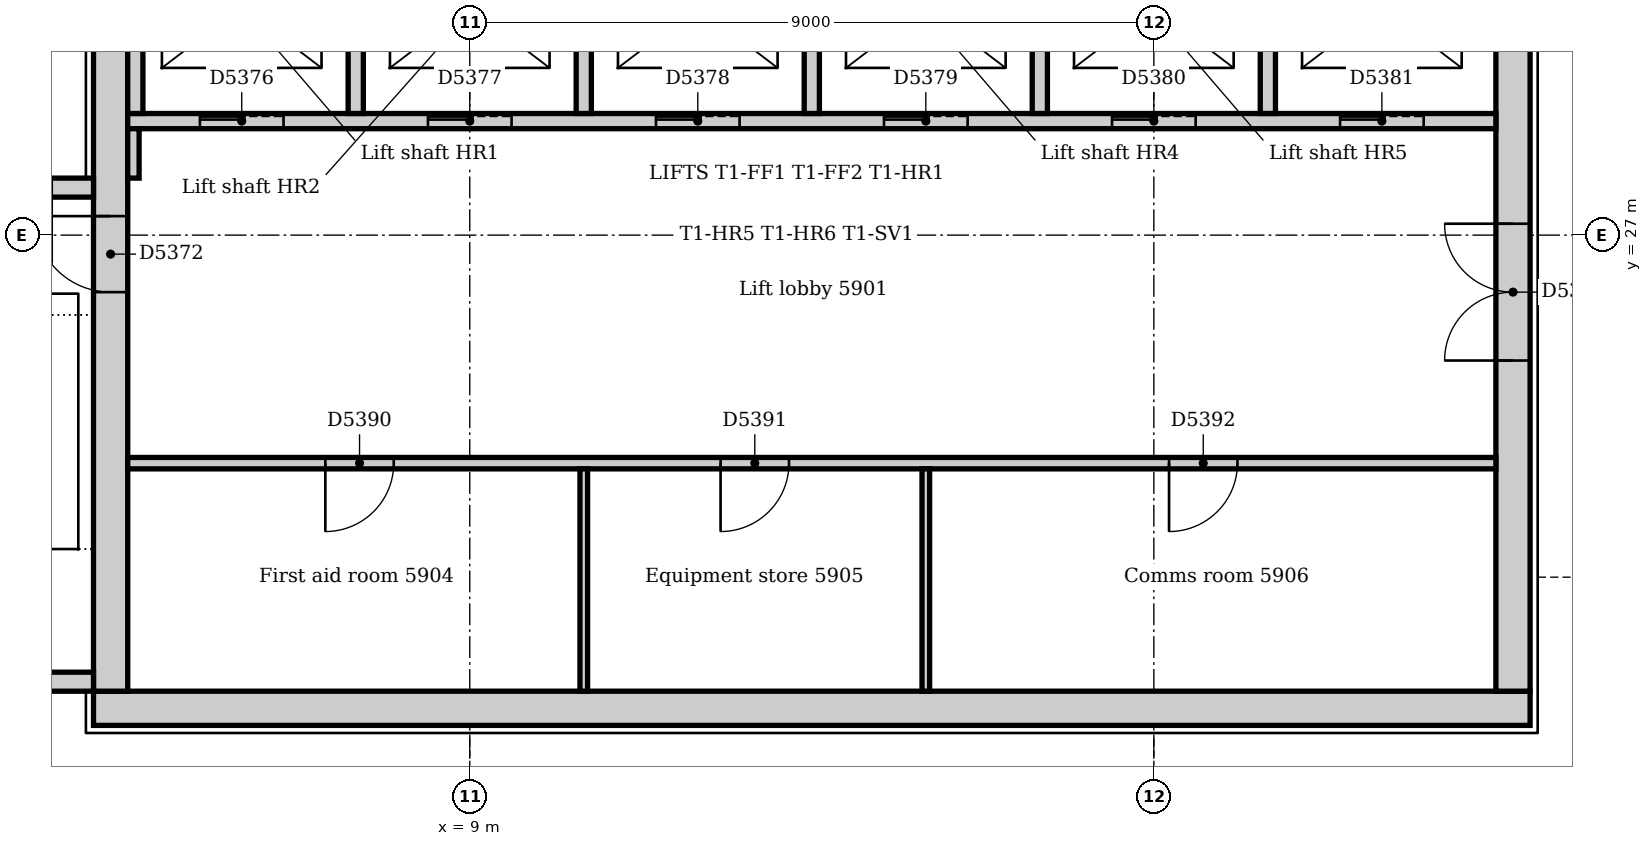
"""IFC4 building model, lengths in metres.
Left out: names, types, materials, properties, quantities, classifications, styles, units other than length and angle.
Written with IfcOpenShell. Run it as: python <this file> out.ifc"""

import sys

from ifc_helpers import new_model, si_unit, direction, frame, frame_2d, origin, place, context, subcontext, project, spatial, rectangle, extrude, element, fill, save


model = new_model("IFC4")
c1 = context("Model", 3, precision=1e-05, world=origin(), true_north=direction((0.0, 1.0)))
c2 = subcontext(c1, "Body", "Model", "MODEL_VIEW")
j1 = project(units=[si_unit("LENGTHUNIT", "METRE"), si_unit("PLANEANGLEUNIT", "RADIAN")], contexts=[c1])
p1 = place(None, origin())
s1 = spatial("IfcSite", under=j1, at=p1, CompositionType="ELEMENT")
p2 = place(p1, origin())
s2 = spatial("IfcBuilding", under=s1, at=p2, CompositionType="ELEMENT")
p3 = place(p2, frame((0.0, 0.0, 247.0)))
s3 = spatial("IfcBuildingStorey", under=s2, at=p3, CompositionType="ELEMENT", Elevation=247.0)
p4 = place(p3, frame((4.05, 20.775, 0.0), z_axis=(0.0, 0.0, 1.0), x_axis=(1.0, 0.0, 0.0)))
e1 = element("IfcWall", 1, at=p4, inside=s3, PredefinedType="SOLIDWALL", context=c2, shape_type="SweptSolid", body=[
    extrude(rectangle(XDim=18.9, YDim=0.45, at=frame_2d((9.45, 0.0))), origin(), (0.0, 0.0, 1.0), 4.0),
])
p5 = place(p3, frame((22.725, 21.0, 0.0), z_axis=(0.0, 0.0, 1.0), x_axis=(0.0, 1.0, 0.0)))
e2 = element("IfcWall", 2, at=p5, inside=s3, PredefinedType="SOLIDWALL", context=c2, shape_type="SweptSolid", body=[
    extrude(rectangle(XDim=10.5, YDim=0.45, at=frame_2d((5.25, 0.0))), origin(), (0.0, 0.0, 1.0), 4.0),
])
p6 = place(p5, frame((4.35, 0.0, 0.0)))
e3 = element("IfcOpeningElement", 3, at=p6, cuts=e2, PredefinedType="OPENING", context=c2, shape_type="SweptSolid", body=[
    extrude(rectangle(XDim=1.8, YDim=2.1, at=frame_2d((0.9, 1.05))), frame((0.0, 0.235, 0.0), z_axis=(0.0, -1.0, 0.0), x_axis=(1.0, 0.0, 0.0)), (0.0, 0.0, 1.0), 0.47),
])
p7 = place(p3, frame((4.275, 31.5, 0.0), z_axis=(0.0, 0.0, 1.0), x_axis=(0.0, -1.0, 0.0)))
e4 = element("IfcWall", 4, at=p7, inside=s3, PredefinedType="SOLIDWALL", context=c2, shape_type="SweptSolid", body=[
    extrude(rectangle(XDim=10.5, YDim=0.45, at=frame_2d((5.25, 0.0))), origin(), (0.0, 0.0, 1.0), 4.0),
])
p8 = place(p7, frame((4.25, 0.0, 0.0)))
e5 = element("IfcOpeningElement", 5, at=p8, cuts=e4, PredefinedType="OPENING", context=c2, shape_type="SweptSolid", body=[
    extrude(rectangle(XDim=1.0, YDim=2.1, at=frame_2d((0.5, 1.05))), frame((0.0, 0.235, 0.0), z_axis=(0.0, -1.0, 0.0), x_axis=(1.0, 0.0, 0.0)), (0.0, 0.0, 1.0), 0.47),
])
p9 = place(p3, frame((0.36, 21.125, 0.0), z_axis=(0.0, 0.0, 1.0), x_axis=(1.0, 0.0, 0.0)))
e6 = element("IfcWall", 6, at=p9, inside=s3, PredefinedType="SOLIDWALL", context=c2, shape_type="SweptSolid", body=[
    extrude(rectangle(XDim=3.69, YDim=0.25, at=frame_2d((1.845, 0.0))), origin(), (0.0, 0.0, 1.0), 4.0),
])
p10 = place(p3, frame((4.05, 27.625, 0.0), z_axis=(0.0, 0.0, 1.0), x_axis=(-1.0, 0.0, 0.0)))
e7 = element("IfcWall", 7, at=p10, inside=s3, PredefinedType="SOLIDWALL", context=c2, shape_type="SweptSolid", body=[
    extrude(rectangle(XDim=3.69, YDim=0.25, at=frame_2d((1.845, 0.0))), origin(), (0.0, 0.0, 1.0), 4.0),
])
p11 = place(p10, frame((0.55, 0.0, 0.0)))
e8 = element("IfcOpeningElement", 8, at=p11, cuts=e7, PredefinedType="OPENING", context=c2, shape_type="SweptSolid", body=[
    extrude(rectangle(XDim=1.0, YDim=2.1, at=frame_2d((0.5, 1.05))), frame((0.0, 0.135, 0.0), z_axis=(0.0, -1.0, 0.0), x_axis=(1.0, 0.0, 0.0)), (0.0, 0.0, 1.0), 0.27),
])
p12 = place(p3, frame((4.5, 28.5, 0.0), z_axis=(0.0, 0.0, 1.0), x_axis=(1.0, 0.0, 0.0)))
e9 = element("IfcWall", 9, at=p12, inside=s3, PredefinedType="PARTITIONING", context=c2, shape_type="SweptSolid", body=[
    extrude(rectangle(XDim=18.0, YDim=0.2, at=frame_2d((9.0, 0.0))), origin(), (0.0, 0.0, 1.0), 3.85),
])
p13 = place(p12, frame((0.95, 0.0, 0.0)))
e10 = element("IfcOpeningElement", 10, at=p13, cuts=e9, PredefinedType="OPENING", context=c2, shape_type="SweptSolid", body=[
    extrude(rectangle(XDim=1.1, YDim=2.1, at=frame_2d((0.55, 1.05))), frame((0.0, 0.11, 0.0), z_axis=(0.0, -1.0, 0.0), x_axis=(1.0, 0.0, 0.0)), (0.0, 0.0, 1.0), 0.22),
])
p14 = place(p12, frame((3.95, 0.0, 0.0)))
e11 = element("IfcOpeningElement", 11, at=p14, cuts=e9, PredefinedType="OPENING", context=c2, shape_type="SweptSolid", body=[
    extrude(rectangle(XDim=1.1, YDim=2.1, at=frame_2d((0.55, 1.05))), frame((0.0, 0.11, 0.0), z_axis=(0.0, -1.0, 0.0), x_axis=(1.0, 0.0, 0.0)), (0.0, 0.0, 1.0), 0.22),
])
p15 = place(p12, frame((6.95, 0.0, 0.0)))
e12 = element("IfcOpeningElement", 12, at=p15, cuts=e9, PredefinedType="OPENING", context=c2, shape_type="SweptSolid", body=[
    extrude(rectangle(XDim=1.1, YDim=2.1, at=frame_2d((0.55, 1.05))), frame((0.0, 0.11, 0.0), z_axis=(0.0, -1.0, 0.0), x_axis=(1.0, 0.0, 0.0)), (0.0, 0.0, 1.0), 0.22),
])
p16 = place(p12, frame((9.95, 0.0, 0.0)))
e13 = element("IfcOpeningElement", 13, at=p16, cuts=e9, PredefinedType="OPENING", context=c2, shape_type="SweptSolid", body=[
    extrude(rectangle(XDim=1.1, YDim=2.1, at=frame_2d((0.55, 1.05))), frame((0.0, 0.11, 0.0), z_axis=(0.0, -1.0, 0.0), x_axis=(1.0, 0.0, 0.0)), (0.0, 0.0, 1.0), 0.22),
])
p17 = place(p12, frame((12.95, 0.0, 0.0)))
e14 = element("IfcOpeningElement", 14, at=p17, cuts=e9, PredefinedType="OPENING", context=c2, shape_type="SweptSolid", body=[
    extrude(rectangle(XDim=1.1, YDim=2.1, at=frame_2d((0.55, 1.05))), frame((0.0, 0.11, 0.0), z_axis=(0.0, -1.0, 0.0), x_axis=(1.0, 0.0, 0.0)), (0.0, 0.0, 1.0), 0.22),
])
p18 = place(p12, frame((15.95, 0.0, 0.0)))
e15 = element("IfcOpeningElement", 15, at=p18, cuts=e9, PredefinedType="OPENING", context=c2, shape_type="SweptSolid", body=[
    extrude(rectangle(XDim=1.1, YDim=2.1, at=frame_2d((0.55, 1.05))), frame((0.0, 0.11, 0.0), z_axis=(0.0, -1.0, 0.0), x_axis=(1.0, 0.0, 0.0)), (0.0, 0.0, 1.0), 0.22),
])
for number, where, z_axis, x_axis in (
    (16, (10.5, 28.6, 0.0), (0.0, 0.0, 1.0), (0.0, 1.0, 0.0)),
    (17, (13.5, 28.6, 0.0), (0.0, 0.0, 1.0), (0.0, 1.0, 0.0)),
    (18, (16.5, 28.6, 0.0), (0.0, 0.0, 1.0), (0.0, 1.0, 0.0)),
    (19, (19.5, 28.6, 0.0), (0.0, 0.0, 1.0), (0.0, 1.0, 0.0)),
    (20, (4.6, 28.6, 0.0), (0.0, 0.0, 1.0), (0.0, 1.0, 0.0)),
    (21, (7.5, 28.6, 0.0), (0.0, 0.0, 1.0), (0.0, 1.0, 0.0)),
):
    element("IfcWall", number, at=place(p3, frame(where, z_axis=z_axis, x_axis=x_axis)), inside=s3, PredefinedType="PARTITIONING", context=c2, shape_type="SweptSolid", body=[
        extrude(rectangle(XDim=2.65, YDim=0.2, at=frame_2d((1.325, 0.0))), origin(), (0.0, 0.0, 1.0), 3.85),
    ])
p19 = place(p3, frame((4.5, 24.0, 0.0), z_axis=(0.0, 0.0, 1.0), x_axis=(1.0, 0.0, 0.0)))
e22 = element("IfcWall", 22, at=p19, inside=s3, PredefinedType="PARTITIONING", context=c2, shape_type="SweptSolid", body=[
    extrude(rectangle(XDim=18.0, YDim=0.15, at=frame_2d((9.0, 0.0))), origin(), (0.0, 0.0, 1.0), 3.85),
])
p20 = place(p19, frame((2.6, 0.0, 0.0)))
e23 = element("IfcOpeningElement", 23, at=p20, cuts=e22, PredefinedType="OPENING", context=c2, shape_type="SweptSolid", body=[
    extrude(rectangle(XDim=0.9, YDim=2.1, at=frame_2d((0.45, 1.05))), frame((0.0, 0.085, 0.0), z_axis=(0.0, -1.0, 0.0), x_axis=(1.0, 0.0, 0.0)), (0.0, 0.0, 1.0), 0.17),
])
p21 = place(p19, frame((7.8, 0.0, 0.0)))
e24 = element("IfcOpeningElement", 24, at=p21, cuts=e22, PredefinedType="OPENING", context=c2, shape_type="SweptSolid", body=[
    extrude(rectangle(XDim=0.9, YDim=2.1, at=frame_2d((0.45, 1.05))), frame((0.0, 0.085, 0.0), z_axis=(0.0, -1.0, 0.0), x_axis=(1.0, 0.0, 0.0)), (0.0, 0.0, 1.0), 0.17),
])
p22 = place(p19, frame((13.7, 0.0, 0.0)))
e25 = element("IfcOpeningElement", 25, at=p22, cuts=e22, PredefinedType="OPENING", context=c2, shape_type="SweptSolid", body=[
    extrude(rectangle(XDim=0.9, YDim=2.1, at=frame_2d((0.45, 1.05))), frame((0.0, 0.085, 0.0), z_axis=(0.0, -1.0, 0.0), x_axis=(1.0, 0.0, 0.0)), (0.0, 0.0, 1.0), 0.17),
])
p23 = place(p3, frame((4.575, 27.75, 0.0), z_axis=(0.0, 0.0, 1.0), x_axis=(0.0, 1.0, 0.0)))
e26 = element("IfcWall", 26, at=p23, inside=s3, PredefinedType="PARTITIONING", context=c2, shape_type="SweptSolid", body=[
    extrude(rectangle(XDim=0.65, YDim=0.15, at=frame_2d((0.325, 0.0))), origin(), (0.0, 0.0, 1.0), 3.85),
])
for number, where, z_axis, x_axis in (
    (27, (10.5, 21.0, 0.0), (0.0, 0.0, 1.0), (0.0, 1.0, 0.0)),
    (28, (15.0, 21.0, 0.0), (0.0, 0.0, 1.0), (0.0, 1.0, 0.0)),
):
    element("IfcWall", number, at=place(p3, frame(where, z_axis=z_axis, x_axis=x_axis)), inside=s3, PredefinedType="PARTITIONING", context=c2, shape_type="SweptSolid", body=[
        extrude(rectangle(XDim=2.925, YDim=0.1, at=frame_2d((1.462, 0.0))), origin(), (0.0, 0.0, 1.0), 3.85),
    ])
p24 = place(p8, frame((1.0, 0.0, 0.0), z_axis=(0.0, 0.0, 1.0), x_axis=(-1.0, 0.0, 0.0)))
e29 = element("IfcDoor", 29, at=p24, inside=s3, OperationType="SINGLE_SWING_RIGHT", PredefinedType="DOOR", context=c2, shape_type="SweptSolid", body=[
    extrude(rectangle(XDim=1.0, YDim=2.1, at=frame_2d((0.5, 1.05))), frame((0.0, 0.025, 0.0), z_axis=(0.0, -1.0, 0.0), x_axis=(1.0, 0.0, 0.0)), (0.0, 0.0, 1.0), 0.05),
])
fill(e5, e29)
p25 = place(p13, origin())
e30 = element("IfcDoor", 30, at=p25, inside=s3, OperationType="SLIDING_TO_LEFT", PredefinedType="DOOR", context=c2, shape_type="SweptSolid", body=[
    extrude(rectangle(XDim=1.1, YDim=2.1, at=frame_2d((0.55, 1.05))), frame((0.0, 0.025, 0.0), z_axis=(0.0, -1.0, 0.0), x_axis=(1.0, 0.0, 0.0)), (0.0, 0.0, 1.0), 0.05),
])
fill(e10, e30)
p26 = place(p14, origin())
e31 = element("IfcDoor", 31, at=p26, inside=s3, OperationType="SLIDING_TO_LEFT", PredefinedType="DOOR", context=c2, shape_type="SweptSolid", body=[
    extrude(rectangle(XDim=1.1, YDim=2.1, at=frame_2d((0.55, 1.05))), frame((0.0, 0.025, 0.0), z_axis=(0.0, -1.0, 0.0), x_axis=(1.0, 0.0, 0.0)), (0.0, 0.0, 1.0), 0.05),
])
fill(e11, e31)
p27 = place(p15, origin())
e32 = element("IfcDoor", 32, at=p27, inside=s3, OperationType="SLIDING_TO_LEFT", PredefinedType="DOOR", context=c2, shape_type="SweptSolid", body=[
    extrude(rectangle(XDim=1.1, YDim=2.1, at=frame_2d((0.55, 1.05))), frame((0.0, 0.025, 0.0), z_axis=(0.0, -1.0, 0.0), x_axis=(1.0, 0.0, 0.0)), (0.0, 0.0, 1.0), 0.05),
])
fill(e12, e32)
p28 = place(p16, origin())
e33 = element("IfcDoor", 33, at=p28, inside=s3, OperationType="SLIDING_TO_LEFT", PredefinedType="DOOR", context=c2, shape_type="SweptSolid", body=[
    extrude(rectangle(XDim=1.1, YDim=2.1, at=frame_2d((0.55, 1.05))), frame((0.0, 0.025, 0.0), z_axis=(0.0, -1.0, 0.0), x_axis=(1.0, 0.0, 0.0)), (0.0, 0.0, 1.0), 0.05),
])
fill(e13, e33)
p29 = place(p17, origin())
e34 = element("IfcDoor", 34, at=p29, inside=s3, OperationType="SLIDING_TO_LEFT", PredefinedType="DOOR", context=c2, shape_type="SweptSolid", body=[
    extrude(rectangle(XDim=1.1, YDim=2.1, at=frame_2d((0.55, 1.05))), frame((0.0, 0.025, 0.0), z_axis=(0.0, -1.0, 0.0), x_axis=(1.0, 0.0, 0.0)), (0.0, 0.0, 1.0), 0.05),
])
fill(e14, e34)
p30 = place(p18, origin())
e35 = element("IfcDoor", 35, at=p30, inside=s3, OperationType="SLIDING_TO_LEFT", PredefinedType="DOOR", context=c2, shape_type="SweptSolid", body=[
    extrude(rectangle(XDim=1.1, YDim=2.1, at=frame_2d((0.55, 1.05))), frame((0.0, 0.025, 0.0), z_axis=(0.0, -1.0, 0.0), x_axis=(1.0, 0.0, 0.0)), (0.0, 0.0, 1.0), 0.05),
])
fill(e15, e35)
p31 = place(p6, origin())
e36 = element("IfcDoor", 36, at=p31, inside=s3, OperationType="DOUBLE_DOOR_DOUBLE_SWING", PredefinedType="DOOR", context=c2, shape_type="SweptSolid", body=[
    extrude(rectangle(XDim=1.8, YDim=2.1, at=frame_2d((0.9, 1.05))), frame((0.0, 0.025, 0.0), z_axis=(0.0, -1.0, 0.0), x_axis=(1.0, 0.0, 0.0)), (0.0, 0.0, 1.0), 0.05),
])
fill(e3, e36)
p32 = place(p20, frame((0.9, 0.0, 0.0), z_axis=(0.0, 0.0, 1.0), x_axis=(-1.0, 0.0, 0.0)))
e37 = element("IfcDoor", 37, at=p32, inside=s3, OperationType="SINGLE_SWING_RIGHT", PredefinedType="DOOR", context=c2, shape_type="SweptSolid", body=[
    extrude(rectangle(XDim=0.9, YDim=2.1, at=frame_2d((0.45, 1.05))), frame((0.0, 0.025, 0.0), z_axis=(0.0, -1.0, 0.0), x_axis=(1.0, 0.0, 0.0)), (0.0, 0.0, 1.0), 0.05),
])
fill(e23, e37)
p33 = place(p21, frame((0.9, 0.0, 0.0), z_axis=(0.0, 0.0, 1.0), x_axis=(-1.0, 0.0, 0.0)))
e38 = element("IfcDoor", 38, at=p33, inside=s3, OperationType="SINGLE_SWING_RIGHT", PredefinedType="DOOR", context=c2, shape_type="SweptSolid", body=[
    extrude(rectangle(XDim=0.9, YDim=2.1, at=frame_2d((0.45, 1.05))), frame((0.0, 0.025, 0.0), z_axis=(0.0, -1.0, 0.0), x_axis=(1.0, 0.0, 0.0)), (0.0, 0.0, 1.0), 0.05),
])
fill(e24, e38)
p34 = place(p22, frame((0.9, 0.0, 0.0), z_axis=(0.0, 0.0, 1.0), x_axis=(-1.0, 0.0, 0.0)))
e39 = element("IfcDoor", 39, at=p34, inside=s3, OperationType="SINGLE_SWING_RIGHT", PredefinedType="DOOR", context=c2, shape_type="SweptSolid", body=[
    extrude(rectangle(XDim=0.9, YDim=2.1, at=frame_2d((0.45, 1.05))), frame((0.0, 0.025, 0.0), z_axis=(0.0, -1.0, 0.0), x_axis=(1.0, 0.0, 0.0)), (0.0, 0.0, 1.0), 0.05),
])
fill(e25, e39)
save(model, sys.argv[1])
